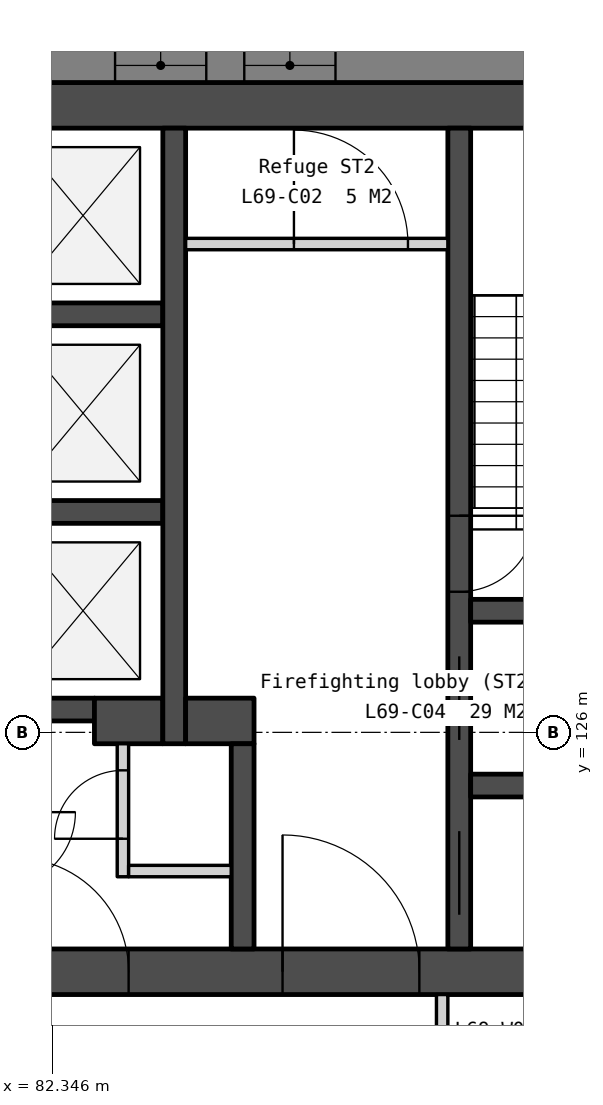
"""IFC4 building model, lengths in metres.
Left out: names, types, materials, properties, quantities, classifications, styles, units other than length and angle.
Written with IfcOpenShell. Run it as: python <this file> out.ifc"""

import sys

from ifc_helpers import new_model, si_unit, direction, frame, frame_2d, origin, place, context, subcontext, project, spatial, polyline, rectangle, outline, extrude, element, fill, save


model = new_model("IFC4")
c1 = context("Model", 3, precision=1e-05, world=origin(), true_north=direction((0.0, 1.0)))
c2 = subcontext(c1, "Body", "Model", "MODEL_VIEW")
j1 = project(units=[si_unit("LENGTHUNIT", "METRE"), si_unit("PLANEANGLEUNIT", "RADIAN")], contexts=[c1])
p1 = place(None, origin())
s1 = spatial("IfcSite", under=j1, at=p1, CompositionType="ELEMENT")
p2 = place(p1, origin())
s2 = spatial("IfcBuilding", under=s1, at=p2, CompositionType="ELEMENT")
p3 = place(p2, frame((0.0, 0.0, 281.6)))
s3 = spatial("IfcBuildingStorey", under=s2, at=p3, CompositionType="ELEMENT", Elevation=281.6)
p4 = place(p3, frame((69.0, 134.25, 0.0), z_axis=(0.0, 0.0, 1.0), x_axis=(1.0, 0.0, 0.0)))
e1 = element("IfcWall", 1, at=p4, inside=s3, PredefinedType="SOLIDWALL", context=c2, shape_type="SweptSolid", body=[
    extrude(rectangle(XDim=22.0, YDim=0.6, at=frame_2d((11.0, 0.0))), origin(), (0.0, 0.0, 1.0), 3.5),
])
p5 = place(p3, frame((69.0, 122.85, 0.0), z_axis=(0.0, 0.0, 1.0), x_axis=(1.0, 0.0, 0.0)))
e2 = element("IfcWall", 2, at=p5, inside=s3, PredefinedType="SOLIDWALL", context=c2, shape_type="SweptSolid", body=[
    extrude(rectangle(XDim=22.0, YDim=0.6, at=frame_2d((11.0, 0.0))), origin(), (0.0, 0.0, 1.0), 3.5),
])
p6 = place(p5, frame((16.375, 0.0, 0.0)))
e3 = element("IfcOpeningElement", 3, at=p6, cuts=e2, PredefinedType="OPENING", context=c2, shape_type="SweptSolid", body=[
    extrude(rectangle(XDim=1.8, YDim=2.1, at=frame_2d((0.9, 1.05))), frame((0.0, 0.31, 0.0), z_axis=(0.0, -1.0, 0.0), x_axis=(1.0, 0.0, 0.0)), (0.0, 0.0, 1.0), 0.62),
])
p7 = place(p5, frame((3.825, 0.0, 0.0)))
e4 = element("IfcOpeningElement", 4, at=p7, cuts=e2, PredefinedType="OPENING", context=c2, shape_type="SweptSolid", body=[
    extrude(rectangle(XDim=1.8, YDim=2.1, at=frame_2d((0.9, 1.05))), frame((0.0, 0.31, 0.0), z_axis=(0.0, -1.0, 0.0), x_axis=(1.0, 0.0, 0.0)), (0.0, 0.0, 1.0), 0.62),
])
p8 = place(p5, frame((12.85, 0.0, 0.0)))
e5 = element("IfcOpeningElement", 5, at=p8, cuts=e2, PredefinedType="OPENING", context=c2, shape_type="SweptSolid", body=[
    extrude(rectangle(XDim=1.5, YDim=2.1, at=frame_2d((0.75, 1.05))), frame((0.0, 0.31, 0.0), z_axis=(0.0, -1.0, 0.0), x_axis=(1.0, 0.0, 0.0)), (0.0, 0.0, 1.0), 0.62),
])
for number, where, z_axis, x_axis in (
    (6, (81.7, 131.5, 0.0), (0.0, 0.0, 1.0), (1.0, 0.0, 0.0)),
    (7, (81.7, 128.9, 0.0), (0.0, 0.0, 1.0), (1.0, 0.0, 0.0)),
):
    element("IfcWall", number, at=place(p3, frame(where, z_axis=z_axis, x_axis=x_axis)), inside=s3, PredefinedType="SOLIDWALL", context=c2, shape_type="SweptSolid", body=[
        extrude(rectangle(XDim=2.1, YDim=0.3, at=frame_2d((1.05, 0.0))), origin(), (0.0, 0.0, 1.0), 3.5),
    ])
p9 = place(p3, frame((81.7, 126.3, 0.0), z_axis=(0.0, 0.0, 1.0), x_axis=(1.0, 0.0, 0.0)))
e8 = element("IfcWall", 8, at=p9, inside=s3, PredefinedType="SOLIDWALL", context=c2, shape_type="SweptSolid", body=[
    extrude(rectangle(XDim=1.2, YDim=0.3, at=frame_2d((0.6, 0.0))), origin(), (0.0, 0.0, 1.0), 3.5),
])
p10 = place(p3, frame((82.9, 126.15, 0.0), z_axis=(0.0, 0.0, 1.0), x_axis=(1.0, 0.0, 0.0)))
e9 = element("IfcWall", 9, at=p10, inside=s3, PredefinedType="SOLIDWALL", context=c2, shape_type="SweptSolid", body=[
    extrude(rectangle(XDim=0.9, YDim=0.6, at=frame_2d((0.45, 0.0))), origin(), (0.0, 0.0, 1.0), 3.5),
])
p11 = place(p3, frame((83.275, 125.85, 0.0), z_axis=(0.0, 0.0, 1.0), x_axis=(0.0, -1.0, 0.0)))
e10 = element("IfcWall", 10, at=p11, inside=s3, PredefinedType="PARTITIONING", context=c2, shape_type="SweptSolid", body=[
    extrude(rectangle(XDim=1.75, YDim=0.15, at=frame_2d((0.875, 0.0))), origin(), (0.0, 0.0, 1.0), 3.5),
])
p12 = place(p11, frame((0.35, 0.0, 0.0)))
e11 = element("IfcOpeningElement", 11, at=p12, cuts=e10, PredefinedType="OPENING", context=c2, shape_type="SweptSolid", body=[
    extrude(rectangle(XDim=0.9, YDim=2.1, at=frame_2d((0.45, 1.05))), frame((0.0, 0.085, 0.0), z_axis=(0.0, -1.0, 0.0), x_axis=(1.0, 0.0, 0.0)), (0.0, 0.0, 1.0), 0.17),
])
p13 = place(p3, frame((83.35, 124.175, 0.0), z_axis=(0.0, 0.0, 1.0), x_axis=(1.0, 0.0, 0.0)))
e12 = element("IfcWall", 12, at=p13, inside=s3, PredefinedType="PARTITIONING", context=c2, shape_type="SweptSolid", body=[
    extrude(rectangle(XDim=1.35, YDim=0.15, at=frame_2d((0.675, 0.0))), origin(), (0.0, 0.0, 1.0), 3.5),
])
p14 = place(p3, frame((83.95, 133.95, 0.0), z_axis=(0.0, 0.0, 1.0), x_axis=(0.0, -1.0, 0.0)))
e13 = element("IfcWall", 13, at=p14, inside=s3, PredefinedType="SOLIDWALL", context=c2, shape_type="SweptSolid", body=[
    extrude(rectangle(XDim=8.1, YDim=0.3, at=frame_2d((4.05, 0.0))), origin(), (0.0, 0.0, 1.0), 3.5),
])
p15 = place(p3, frame((84.1, 132.425, 0.0), z_axis=(0.0, 0.0, 1.0), x_axis=(1.0, 0.0, 0.0)))
e14 = element("IfcWall", 14, at=p15, inside=s3, PredefinedType="PARTITIONING", context=c2, shape_type="SweptSolid", body=[
    extrude(rectangle(XDim=3.45, YDim=0.15, at=frame_2d((1.725, 0.0))), origin(), (0.0, 0.0, 1.0), 3.5),
])
p16 = place(p15, frame((1.425, 0.0, 0.0)))
e15 = element("IfcOpeningElement", 15, at=p16, cuts=e14, PredefinedType="OPENING", context=c2, shape_type="SweptSolid", body=[
    extrude(rectangle(XDim=1.5, YDim=2.1, at=frame_2d((0.75, 1.05))), frame((0.0, 0.085, 0.0), z_axis=(0.0, -1.0, 0.0), x_axis=(1.0, 0.0, 0.0)), (0.0, 0.0, 1.0), 0.17),
])
p17 = place(p3, frame((84.1, 126.15, 0.0), z_axis=(0.0, 0.0, 1.0), x_axis=(1.0, 0.0, 0.0)))
e16 = element("IfcWall", 16, at=p17, inside=s3, PredefinedType="SOLIDWALL", context=c2, shape_type="SweptSolid", body=[
    extrude(rectangle(XDim=0.9, YDim=0.6, at=frame_2d((0.45, 0.0))), origin(), (0.0, 0.0, 1.0), 3.5),
])
p18 = place(p3, frame((84.85, 125.85, 0.0), z_axis=(0.0, 0.0, 1.0), x_axis=(0.0, -1.0, 0.0)))
e17 = element("IfcWall", 17, at=p18, inside=s3, PredefinedType="SOLIDWALL", context=c2, shape_type="SweptSolid", body=[
    extrude(rectangle(XDim=2.7, YDim=0.3, at=frame_2d((1.35, 0.0))), origin(), (0.0, 0.0, 1.0), 3.5),
])
p19 = place(p3, frame((87.7, 133.95, 0.0), z_axis=(0.0, 0.0, 1.0), x_axis=(0.0, -1.0, 0.0)))
e18 = element("IfcWall", 18, at=p19, inside=s3, PredefinedType="SOLIDWALL", context=c2, shape_type="SweptSolid", body=[
    extrude(rectangle(XDim=10.8, YDim=0.3, at=frame_2d((5.4, 0.0))), origin(), (0.0, 0.0, 1.0), 3.5),
])
p20 = place(p19, frame((6.95, 0.0, 0.0)))
e19 = element("IfcOpeningElement", 19, at=p20, cuts=e18, PredefinedType="OPENING", context=c2, shape_type="SweptSolid", body=[
    extrude(rectangle(XDim=1.1, YDim=2.1, at=frame_2d((0.55, 1.05))), frame((0.0, 0.16, 0.0), z_axis=(0.0, -1.0, 0.0), x_axis=(1.0, 0.0, 0.0)), (0.0, 0.0, 1.0), 0.32),
])
p21 = place(p19, frame((5.1, 0.0, 0.0)))
e20 = element("IfcOpeningElement", 20, at=p21, cuts=e18, PredefinedType="OPENING", context=c2, shape_type="SweptSolid", body=[
    extrude(rectangle(XDim=1.0, YDim=2.1, at=frame_2d((0.5, 1.05))), frame((0.0, 0.16, 0.0), z_axis=(0.0, -1.0, 0.0), x_axis=(1.0, 0.0, 0.0)), (0.0, 0.0, 1.0), 0.32),
])
p22 = place(p19, frame((9.25, 0.0, 0.0)))
e21 = element("IfcOpeningElement", 21, at=p22, cuts=e18, PredefinedType="OPENING", context=c2, shape_type="SweptSolid", body=[
    extrude(rectangle(XDim=1.1, YDim=2.1, at=frame_2d((0.55, 1.05))), frame((0.0, 0.16, 0.0), z_axis=(0.0, -1.0, 0.0), x_axis=(1.0, 0.0, 0.0)), (0.0, 0.0, 1.0), 0.32),
])
for number, where, z_axis, x_axis in (
    (22, (87.85, 127.6, 0.0), (0.0, 0.0, 1.0), (1.0, 0.0, 0.0)),
    (23, (87.85, 125.3, 0.0), (0.0, 0.0, 1.0), (1.0, 0.0, 0.0)),
):
    element("IfcWall", number, at=place(p3, frame(where, z_axis=z_axis, x_axis=x_axis)), inside=s3, PredefinedType="SOLIDWALL", context=c2, shape_type="SweptSolid", body=[
        extrude(rectangle(XDim=2.55, YDim=0.3, at=frame_2d((1.275, 0.0))), origin(), (0.0, 0.0, 1.0), 3.5),
    ])
p23 = place(p3, frame((98.486, 134.775, -0.15), z_axis=(0.0, 0.0, 1.0), x_axis=(-1.0, 0.0, 0.0)))
e24 = element("IfcWall", 24, at=p23, inside=s3, PredefinedType="SOLIDWALL", context=c2, shape_type="SweptSolid", body=[
    extrude(outline(polyline([(36.972, 0.0), (36.972, 3.55), (0.0, 3.55), (0.0, 0.0), (36.972, 0.0)])), frame((0.0, 0.225, 0.0), z_axis=(0.0, -1.0, 0.0), x_axis=(1.0, 0.0, 0.0)), (0.0, 0.0, 1.0), 0.45),
])
p24 = place(p23, frame((3.172, 0.0, 0.95)))
e25 = element("IfcOpeningElement", 25, at=p24, cuts=e24, PredefinedType="OPENING", context=c2, shape_type="SweptSolid", body=[
    extrude(rectangle(XDim=1.2, YDim=2.2, at=frame_2d((0.6, 1.1))), frame((0.0, 0.235, 0.0), z_axis=(0.0, -1.0, 0.0), x_axis=(1.0, 0.0, 0.0)), (0.0, 0.0, 1.0), 0.47),
])
p25 = place(p23, frame((4.872, 0.0, 0.95)))
e26 = element("IfcOpeningElement", 26, at=p25, cuts=e24, PredefinedType="OPENING", context=c2, shape_type="SweptSolid", body=[
    extrude(rectangle(XDim=1.2, YDim=2.2, at=frame_2d((0.6, 1.1))), frame((0.0, 0.235, 0.0), z_axis=(0.0, -1.0, 0.0), x_axis=(1.0, 0.0, 0.0)), (0.0, 0.0, 1.0), 0.47),
])
p26 = place(p23, frame((12.415, 0.0, 0.95)))
e27 = element("IfcOpeningElement", 27, at=p26, cuts=e24, PredefinedType="OPENING", context=c2, shape_type="SweptSolid", body=[
    extrude(rectangle(XDim=1.2, YDim=2.2, at=frame_2d((0.6, 1.1))), frame((0.0, 0.235, 0.0), z_axis=(0.0, -1.0, 0.0), x_axis=(1.0, 0.0, 0.0)), (0.0, 0.0, 1.0), 0.47),
])
p27 = place(p23, frame((14.115, 0.0, 0.95)))
e28 = element("IfcOpeningElement", 28, at=p27, cuts=e24, PredefinedType="OPENING", context=c2, shape_type="SweptSolid", body=[
    extrude(rectangle(XDim=1.2, YDim=2.2, at=frame_2d((0.6, 1.1))), frame((0.0, 0.235, 0.0), z_axis=(0.0, -1.0, 0.0), x_axis=(1.0, 0.0, 0.0)), (0.0, 0.0, 1.0), 0.47),
])
p28 = place(p23, frame((21.658, 0.0, 0.95)))
e29 = element("IfcOpeningElement", 29, at=p28, cuts=e24, PredefinedType="OPENING", context=c2, shape_type="SweptSolid", body=[
    extrude(rectangle(XDim=1.2, YDim=2.2, at=frame_2d((0.6, 1.1))), frame((0.0, 0.235, 0.0), z_axis=(0.0, -1.0, 0.0), x_axis=(1.0, 0.0, 0.0)), (0.0, 0.0, 1.0), 0.47),
])
p29 = place(p23, frame((23.358, 0.0, 0.95)))
e30 = element("IfcOpeningElement", 30, at=p29, cuts=e24, PredefinedType="OPENING", context=c2, shape_type="SweptSolid", body=[
    extrude(rectangle(XDim=1.2, YDim=2.2, at=frame_2d((0.6, 1.1))), frame((0.0, 0.235, 0.0), z_axis=(0.0, -1.0, 0.0), x_axis=(1.0, 0.0, 0.0)), (0.0, 0.0, 1.0), 0.47),
])
p30 = place(p23, frame((30.901, 0.0, 0.95)))
e31 = element("IfcOpeningElement", 31, at=p30, cuts=e24, PredefinedType="OPENING", context=c2, shape_type="SweptSolid", body=[
    extrude(rectangle(XDim=1.2, YDim=2.2, at=frame_2d((0.6, 1.1))), frame((0.0, 0.235, 0.0), z_axis=(0.0, -1.0, 0.0), x_axis=(1.0, 0.0, 0.0)), (0.0, 0.0, 1.0), 0.47),
])
p31 = place(p23, frame((32.601, 0.0, 0.95)))
e32 = element("IfcOpeningElement", 32, at=p31, cuts=e24, PredefinedType="OPENING", context=c2, shape_type="SweptSolid", body=[
    extrude(rectangle(XDim=1.2, YDim=2.2, at=frame_2d((0.6, 1.1))), frame((0.0, 0.235, 0.0), z_axis=(0.0, -1.0, 0.0), x_axis=(1.0, 0.0, 0.0)), (0.0, 0.0, 1.0), 0.47),
])
p32 = place(p3, frame((80.905, 101.188, -0.15), z_axis=(0.0, 0.0, 1.0), x_axis=(0.500002536638, 0.866023939251, 0.0)))
e33 = element("IfcWall", 33, at=p32, inside=s3, PredefinedType="SOLIDWALL", context=c2, shape_type="SweptSolid", body=[
    extrude(outline(polyline([(36.972, 0.0), (36.972, 3.55), (0.0, 3.55), (0.0, 0.0), (36.972, 0.0)])), frame((0.0, 0.225, 0.0), z_axis=(0.0, -1.0, 0.0), x_axis=(1.0, 0.0, 0.0)), (0.0, 0.0, 1.0), 0.45),
])
p33 = place(p32, frame((3.172, 0.0, 0.95)))
e34 = element("IfcOpeningElement", 34, at=p33, cuts=e33, PredefinedType="OPENING", context=c2, shape_type="SweptSolid", body=[
    extrude(rectangle(XDim=1.2, YDim=2.2, at=frame_2d((0.6, 1.1))), frame((0.0, 0.235, 0.0), z_axis=(0.0, -1.0, 0.0), x_axis=(1.0, 0.0, 0.0)), (0.0, 0.0, 1.0), 0.47),
])
p34 = place(p32, frame((4.872, 0.0, 0.95)))
e35 = element("IfcOpeningElement", 35, at=p34, cuts=e33, PredefinedType="OPENING", context=c2, shape_type="SweptSolid", body=[
    extrude(rectangle(XDim=1.2, YDim=2.2, at=frame_2d((0.6, 1.1))), frame((0.0, 0.235, 0.0), z_axis=(0.0, -1.0, 0.0), x_axis=(1.0, 0.0, 0.0)), (0.0, 0.0, 1.0), 0.47),
])
p35 = place(p32, frame((12.415, 0.0, 0.95)))
e36 = element("IfcOpeningElement", 36, at=p35, cuts=e33, PredefinedType="OPENING", context=c2, shape_type="SweptSolid", body=[
    extrude(rectangle(XDim=1.2, YDim=2.2, at=frame_2d((0.6, 1.1))), frame((0.0, 0.235, 0.0), z_axis=(0.0, -1.0, 0.0), x_axis=(1.0, 0.0, 0.0)), (0.0, 0.0, 1.0), 0.47),
])
p36 = place(p32, frame((14.115, 0.0, 0.95)))
e37 = element("IfcOpeningElement", 37, at=p36, cuts=e33, PredefinedType="OPENING", context=c2, shape_type="SweptSolid", body=[
    extrude(rectangle(XDim=1.2, YDim=2.2, at=frame_2d((0.6, 1.1))), frame((0.0, 0.235, 0.0), z_axis=(0.0, -1.0, 0.0), x_axis=(1.0, 0.0, 0.0)), (0.0, 0.0, 1.0), 0.47),
])
p37 = place(p32, frame((21.658, 0.0, 0.95)))
e38 = element("IfcOpeningElement", 38, at=p37, cuts=e33, PredefinedType="OPENING", context=c2, shape_type="SweptSolid", body=[
    extrude(rectangle(XDim=1.2, YDim=2.2, at=frame_2d((0.6, 1.1))), frame((0.0, 0.235, 0.0), z_axis=(0.0, -1.0, 0.0), x_axis=(1.0, 0.0, 0.0)), (0.0, 0.0, 1.0), 0.47),
])
p38 = place(p32, frame((23.358, 0.0, 0.95)))
e39 = element("IfcOpeningElement", 39, at=p38, cuts=e33, PredefinedType="OPENING", context=c2, shape_type="SweptSolid", body=[
    extrude(rectangle(XDim=1.2, YDim=2.2, at=frame_2d((0.6, 1.1))), frame((0.0, 0.235, 0.0), z_axis=(0.0, -1.0, 0.0), x_axis=(1.0, 0.0, 0.0)), (0.0, 0.0, 1.0), 0.47),
])
p39 = place(p32, frame((30.901, 0.0, 0.95)))
e40 = element("IfcOpeningElement", 40, at=p39, cuts=e33, PredefinedType="OPENING", context=c2, shape_type="SweptSolid", body=[
    extrude(rectangle(XDim=1.2, YDim=2.2, at=frame_2d((0.6, 1.1))), frame((0.0, 0.235, 0.0), z_axis=(0.0, -1.0, 0.0), x_axis=(1.0, 0.0, 0.0)), (0.0, 0.0, 1.0), 0.47),
])
p40 = place(p32, frame((32.601, 0.0, 0.95)))
e41 = element("IfcOpeningElement", 41, at=p40, cuts=e33, PredefinedType="OPENING", context=c2, shape_type="SweptSolid", body=[
    extrude(rectangle(XDim=1.2, YDim=2.2, at=frame_2d((0.6, 1.1))), frame((0.0, 0.235, 0.0), z_axis=(0.0, -1.0, 0.0), x_axis=(1.0, 0.0, 0.0)), (0.0, 0.0, 1.0), 0.47),
])
p41 = place(p3, frame((87.475, 120.025, 0.0), z_axis=(0.0, 0.0, 1.0), x_axis=(0.0, 1.0, 0.0)))
e42 = element("IfcWall", 42, at=p41, inside=s3, PredefinedType="PARTITIONING", context=c2, shape_type="SweptSolid", body=[
    extrude(rectangle(XDim=2.525, YDim=0.15, at=frame_2d((1.263, 0.0))), origin(), (0.0, 0.0, 1.0), 3.5),
])
p42 = place(p41, frame((0.762, 0.0, 0.0)))
e43 = element("IfcOpeningElement", 43, at=p42, cuts=e42, PredefinedType="OPENING", context=c2, shape_type="SweptSolid", body=[
    extrude(rectangle(XDim=1.0, YDim=2.1, at=frame_2d((0.5, 1.05))), frame((0.0, 0.085, 0.0), z_axis=(0.0, -1.0, 0.0), x_axis=(1.0, 0.0, 0.0)), (0.0, 0.0, 1.0), 0.17),
])
p43 = place(p20, origin())
e44 = element("IfcDoor", 44, at=p43, inside=s3, OperationType="SLIDING_TO_LEFT", PredefinedType="DOOR", context=c2, shape_type="SweptSolid", body=[
    extrude(rectangle(XDim=1.1, YDim=2.1, at=frame_2d((0.55, 1.05))), frame((0.0, 0.025, 0.0), z_axis=(0.0, -1.0, 0.0), x_axis=(1.0, 0.0, 0.0)), (0.0, 0.0, 1.0), 0.05),
])
fill(e19, e44)
p44 = place(p6, origin())
e45 = element("IfcDoor", 45, at=p44, inside=s3, OperationType="DOUBLE_DOOR_DOUBLE_SWING", PredefinedType="DOOR", context=c2, shape_type="SweptSolid", body=[
    extrude(rectangle(XDim=1.8, YDim=2.1, at=frame_2d((0.9, 1.05))), frame((0.0, 0.025, 0.0), z_axis=(0.0, -1.0, 0.0), x_axis=(1.0, 0.0, 0.0)), (0.0, 0.0, 1.0), 0.05),
])
fill(e3, e45)
p45 = place(p8, origin())
e46 = element("IfcDoor", 46, at=p45, inside=s3, OperationType="DOUBLE_DOOR_DOUBLE_SWING", PredefinedType="DOOR", context=c2, shape_type="SweptSolid", body=[
    extrude(rectangle(XDim=1.5, YDim=2.1, at=frame_2d((0.75, 1.05))), frame((0.0, 0.025, 0.0), z_axis=(0.0, -1.0, 0.0), x_axis=(1.0, 0.0, 0.0)), (0.0, 0.0, 1.0), 0.05),
])
fill(e5, e46)
p46 = place(p12, origin())
e47 = element("IfcDoor", 47, at=p46, inside=s3, OperationType="SINGLE_SWING_RIGHT", PredefinedType="DOOR", context=c2, shape_type="SweptSolid", body=[
    extrude(rectangle(XDim=0.9, YDim=2.1, at=frame_2d((0.45, 1.05))), frame((0.0, 0.025, 0.0), z_axis=(0.0, -1.0, 0.0), x_axis=(1.0, 0.0, 0.0)), (0.0, 0.0, 1.0), 0.05),
])
fill(e11, e47)
p47 = place(p16, origin())
e48 = element("IfcDoor", 48, at=p47, inside=s3, OperationType="DOUBLE_DOOR_DOUBLE_SWING", PredefinedType="DOOR", context=c2, shape_type="SweptSolid", body=[
    extrude(rectangle(XDim=1.5, YDim=2.1, at=frame_2d((0.75, 1.05))), frame((0.0, 0.025, 0.0), z_axis=(0.0, -1.0, 0.0), x_axis=(1.0, 0.0, 0.0)), (0.0, 0.0, 1.0), 0.05),
])
fill(e15, e48)
p48 = place(p21, origin())
e49 = element("IfcDoor", 49, at=p48, inside=s3, OperationType="SINGLE_SWING_LEFT", PredefinedType="DOOR", context=c2, shape_type="SweptSolid", body=[
    extrude(rectangle(XDim=1.0, YDim=2.1, at=frame_2d((0.5, 1.05))), frame((0.0, 0.025, 0.0), z_axis=(0.0, -1.0, 0.0), x_axis=(1.0, 0.0, 0.0)), (0.0, 0.0, 1.0), 0.05),
])
fill(e20, e49)
p49 = place(p22, origin())
e50 = element("IfcDoor", 50, at=p49, inside=s3, OperationType="SLIDING_TO_LEFT", PredefinedType="DOOR", context=c2, shape_type="SweptSolid", body=[
    extrude(rectangle(XDim=1.1, YDim=2.1, at=frame_2d((0.55, 1.05))), frame((0.0, 0.025, 0.0), z_axis=(0.0, -1.0, 0.0), x_axis=(1.0, 0.0, 0.0)), (0.0, 0.0, 1.0), 0.05),
])
fill(e21, e50)
p50 = place(p26, origin())
e51 = element("IfcWindow", 51, at=p50, inside=s3, PartitioningType="SINGLE_PANEL", PredefinedType="WINDOW", context=c2, shape_type="SweptSolid", body=[
    extrude(rectangle(XDim=1.2, YDim=2.2, at=frame_2d((0.6, 1.1))), frame((0.0, 0.03, 0.0), z_axis=(0.0, -1.0, 0.0), x_axis=(1.0, 0.0, 0.0)), (0.0, 0.0, 1.0), 0.06),
])
fill(e27, e51)
p51 = place(p27, origin())
e52 = element("IfcWindow", 52, at=p51, inside=s3, PartitioningType="SINGLE_PANEL", PredefinedType="WINDOW", context=c2, shape_type="SweptSolid", body=[
    extrude(rectangle(XDim=1.2, YDim=2.2, at=frame_2d((0.6, 1.1))), frame((0.0, 0.03, 0.0), z_axis=(0.0, -1.0, 0.0), x_axis=(1.0, 0.0, 0.0)), (0.0, 0.0, 1.0), 0.06),
])
fill(e28, e52)
save(model, sys.argv[1])
